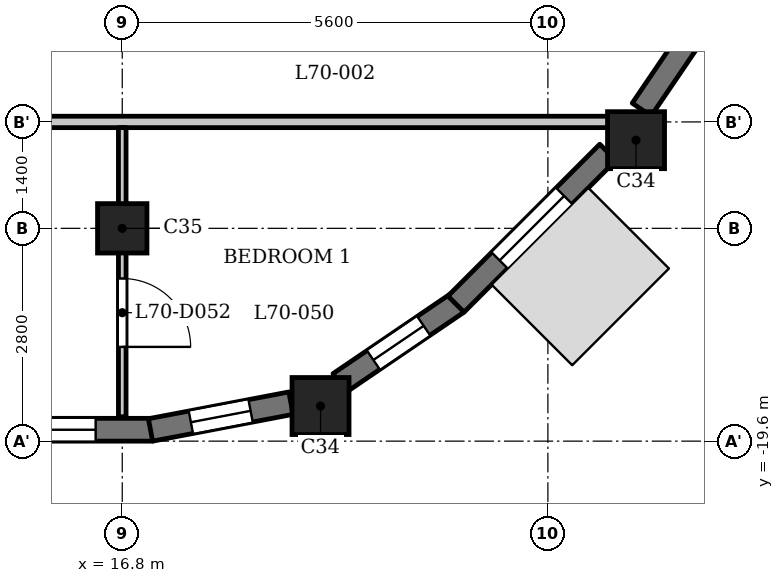
"""IFC4 building model, lengths in metres.
Left out: names, types, materials, properties, quantities, classifications, styles, units other than length and angle.
Written with IfcOpenShell. Run it as: python <this file> out.ifc"""

import sys

from ifc_helpers import new_model, si_unit, direction, frame, frame_2d, origin, origin_2d, place, context, subcontext, project, spatial, rectangle, extrude, element, fill, save


model = new_model("IFC4")
c1 = context("Model", 3, precision=1e-05, world=origin(), true_north=direction((0.0, 1.0)))
c2 = subcontext(c1, "Body", "Model", "MODEL_VIEW")
j1 = project(units=[si_unit("LENGTHUNIT", "METRE"), si_unit("PLANEANGLEUNIT", "RADIAN")], contexts=[c1])
p1 = place(None, origin())
s1 = spatial("IfcSite", under=j1, at=p1, CompositionType="ELEMENT")
p2 = place(p1, origin())
s2 = spatial("IfcBuilding", under=s1, at=p2, CompositionType="ELEMENT")
p3 = place(p2, frame((0.0, 0.0, 269.7)))
s3 = spatial("IfcBuildingStorey", under=s2, at=p3, CompositionType="ELEMENT", Elevation=269.7)
for number, where, z_axis, x_axis in (
    (1, (19.409, -19.138, 0.0), (0.0, 0.0, 1.0), (1.0, 0.0, 0.0)),
    (2, (23.56, -15.64, 0.0), (0.0, 0.0, 1.0), (1.0, 0.0, 0.0)),
):
    element("IfcColumn", number, at=place(p3, frame(where, z_axis=z_axis, x_axis=x_axis)), inside=s3, PredefinedType="COLUMN", context=c2, shape_type="SweptSolid", body=[
        extrude(rectangle(XDim=0.75, YDim=0.75, at=origin_2d()), origin(), (0.0, 0.0, 1.0), 3.5),
    ])
p4 = place(p3, frame((16.8, -16.8, 0.0), z_axis=(0.0, 0.0, 1.0), x_axis=(1.0, 0.0, 0.0)))
e3 = element("IfcColumn", 3, at=p4, inside=s3, PredefinedType="COLUMN", context=c2, shape_type="SweptSolid", body=[
    extrude(rectangle(XDim=0.65, YDim=0.65, at=origin_2d()), origin(), (0.0, 0.0, 1.0), 3.5),
])
p5 = place(p3, frame((14.375, -19.45, 0.0), z_axis=(0.0, 0.0, 1.0), x_axis=(1.0, 0.0, 0.0)))
e4 = element("IfcWall", 4, at=p5, inside=s3, PredefinedType="SOLIDWALL", context=c2, shape_type="SweptSolid", body=[
    extrude(rectangle(XDim=2.825, YDim=0.3, at=frame_2d((1.413, 0.0))), origin(), (0.0, 0.0, 1.0), 2.55),
])
p6 = place(p5, frame((0.275, 0.0, 0.9)))
e5 = element("IfcOpeningElement", 5, at=p6, cuts=e4, PredefinedType="OPENING", context=c2, shape_type="SweptSolid", body=[
    extrude(rectangle(XDim=1.8, YDim=1.25, at=frame_2d((0.9, 0.625))), frame((0.0, 0.16, 0.0), z_axis=(0.0, -1.0, 0.0), x_axis=(1.0, 0.0, 0.0)), (0.0, 0.0, 1.0), 0.32),
])
p7 = place(p3, frame((17.172, -19.453, 0.0), z_axis=(0.0, 0.0, 1.0), x_axis=(0.982284001233, 0.187398348234, 0.0)))
e6 = element("IfcWall", 6, at=p7, inside=s3, PredefinedType="SOLIDWALL", context=c2, shape_type="SweptSolid", body=[
    extrude(rectangle(XDim=1.881, YDim=0.3, at=frame_2d((0.941, 0.0))), origin(), (0.0, 0.0, 1.0), 2.55),
])
p8 = place(p7, frame((0.541, 0.0, 0.6)))
e7 = element("IfcOpeningElement", 7, at=p8, cuts=e6, PredefinedType="OPENING", context=c2, shape_type="SweptSolid", body=[
    extrude(rectangle(XDim=0.8, YDim=1.55, at=frame_2d((0.4, 0.775))), frame((0.0, 0.16, 0.0), z_axis=(0.0, -1.0, 0.0), x_axis=(1.0, 0.0, 0.0)), (0.0, 0.0, 1.0), 0.32),
])
p9 = place(p3, frame((19.657, -18.836, 0.0), z_axis=(0.0, 0.0, 1.0), x_axis=(0.82704477487, 0.562136051469, 0.0)))
e8 = element("IfcWall", 8, at=p9, inside=s3, PredefinedType="SOLIDWALL", context=c2, shape_type="SweptSolid", body=[
    extrude(rectangle(XDim=1.881, YDim=0.3, at=frame_2d((0.94, 0.0))), origin(), (0.0, 0.0, 1.0), 2.55),
])
p10 = place(p9, frame((0.541, 0.0, 0.6)))
e9 = element("IfcOpeningElement", 9, at=p10, cuts=e8, PredefinedType="OPENING", context=c2, shape_type="SweptSolid", body=[
    extrude(rectangle(XDim=0.8, YDim=1.55, at=frame_2d((0.4, 0.775))), frame((0.0, 0.16, 0.0), z_axis=(0.0, -1.0, 0.0), x_axis=(1.0, 0.0, 0.0)), (0.0, 0.0, 1.0), 0.32),
])
p11 = place(p3, frame((21.191, -17.797, 0.0), z_axis=(0.0, 0.0, 1.0), x_axis=(0.707106781187, 0.707106781187, 0.0)))
e10 = element("IfcWall", 10, at=p11, inside=s3, PredefinedType="SOLIDWALL", context=c2, shape_type="SweptSolid", body=[
    extrude(rectangle(XDim=2.825, YDim=0.3, at=frame_2d((1.413, 0.0))), origin(), (0.0, 0.0, 1.0), 2.55),
])
p12 = place(p11, frame((0.812, 0.0, 0.6)))
e11 = element("IfcOpeningElement", 11, at=p12, cuts=e10, PredefinedType="OPENING", context=c2, shape_type="SweptSolid", body=[
    extrude(rectangle(XDim=1.2, YDim=1.55, at=frame_2d((0.6, 0.775))), frame((0.0, 0.16, 0.0), z_axis=(0.0, -1.0, 0.0), x_axis=(1.0, 0.0, 0.0)), (0.0, 0.0, 1.0), 0.32),
])
p13 = place(p3, frame((23.634, -15.237, 0.0), z_axis=(0.0, 0.0, 1.0), x_axis=(0.562099454787, 0.827069648173, 0.0)))
e12 = element("IfcWall", 12, at=p13, inside=s3, PredefinedType="SOLIDWALL", context=c2, shape_type="SweptSolid", body=[
    extrude(rectangle(XDim=1.427, YDim=0.3, at=frame_2d((0.714, 0.0))), origin(), (0.0, 0.0, 1.0), 2.55),
])
p14 = place(p3, frame((-23.322, -15.4, 0.0), z_axis=(0.0, 0.0, 1.0), x_axis=(1.0, 0.0, 0.0)))
e13 = element("IfcWall", 13, at=p14, inside=s3, PredefinedType="PARTITIONING", context=c2, shape_type="SweptSolid", body=[
    extrude(rectangle(XDim=46.872, YDim=0.15, at=frame_2d((23.436, 0.0))), origin(), (0.0, 0.0, 1.0), 3.2),
])
p15 = place(p14, frame((8.172, 0.0, 0.0)))
e14 = element("IfcOpeningElement", 14, at=p15, cuts=e13, PredefinedType="OPENING", context=c2, shape_type="SweptSolid", body=[
    extrude(rectangle(XDim=1.0, YDim=2.1, at=frame_2d((0.5, 1.05))), frame((0.0, 0.085, 0.0), z_axis=(0.0, -1.0, 0.0), x_axis=(1.0, 0.0, 0.0)), (0.0, 0.0, 1.0), 0.17),
])
p16 = place(p14, frame((15.172, 0.0, 0.0)))
e15 = element("IfcOpeningElement", 15, at=p16, cuts=e13, PredefinedType="OPENING", context=c2, shape_type="SweptSolid", body=[
    extrude(rectangle(XDim=1.0, YDim=2.1, at=frame_2d((0.5, 1.05))), frame((0.0, 0.085, 0.0), z_axis=(0.0, -1.0, 0.0), x_axis=(1.0, 0.0, 0.0)), (0.0, 0.0, 1.0), 0.17),
])
p17 = place(p14, frame((31.972, 0.0, 0.0)))
e16 = element("IfcOpeningElement", 16, at=p17, cuts=e13, PredefinedType="OPENING", context=c2, shape_type="SweptSolid", body=[
    extrude(rectangle(XDim=1.0, YDim=2.1, at=frame_2d((0.5, 1.05))), frame((0.0, 0.085, 0.0), z_axis=(0.0, -1.0, 0.0), x_axis=(1.0, 0.0, 0.0)), (0.0, 0.0, 1.0), 0.17),
])
p18 = place(p3, frame((16.8, -19.28, 0.0), z_axis=(0.0, 0.0, 1.0), x_axis=(0.0, 1.0, 0.0)))
e17 = element("IfcWall", 17, at=p18, inside=s3, PredefinedType="PARTITIONING", context=c2, shape_type="SweptSolid", body=[
    extrude(rectangle(XDim=3.805, YDim=0.1, at=frame_2d((1.902, 0.0))), origin(), (0.0, 0.0, 1.0), 3.2),
])
p19 = place(p18, frame((0.92, 0.0, 0.0)))
e18 = element("IfcOpeningElement", 18, at=p19, cuts=e17, PredefinedType="OPENING", context=c2, shape_type="SweptSolid", body=[
    extrude(rectangle(XDim=0.9, YDim=2.1, at=frame_2d((0.45, 1.05))), frame((0.0, 0.06, 0.0), z_axis=(0.0, -1.0, 0.0), x_axis=(1.0, 0.0, 0.0)), (0.0, 0.0, 1.0), 0.12),
])
p20 = place(p19, origin())
e19 = element("IfcDoor", 19, at=p20, inside=s3, OperationType="SINGLE_SWING_LEFT", PredefinedType="DOOR", context=c2, shape_type="SweptSolid", body=[
    extrude(rectangle(XDim=0.9, YDim=2.1, at=frame_2d((0.45, 1.05))), frame((0.0, 0.025, 0.0), z_axis=(0.0, -1.0, 0.0), x_axis=(1.0, 0.0, 0.0)), (0.0, 0.0, 1.0), 0.05),
])
fill(e18, e19)
p21 = place(p6, origin())
e20 = element("IfcWindow", 20, at=p21, inside=s3, PartitioningType="SINGLE_PANEL", PredefinedType="WINDOW", context=c2, shape_type="SweptSolid", body=[
    extrude(rectangle(XDim=1.8, YDim=1.25, at=frame_2d((0.9, 0.625))), frame((0.0, 0.03, 0.0), z_axis=(0.0, -1.0, 0.0), x_axis=(1.0, 0.0, 0.0)), (0.0, 0.0, 1.0), 0.06),
])
fill(e5, e20)
p22 = place(p8, origin())
e21 = element("IfcWindow", 21, at=p22, inside=s3, PartitioningType="SINGLE_PANEL", PredefinedType="WINDOW", context=c2, shape_type="SweptSolid", body=[
    extrude(rectangle(XDim=0.8, YDim=1.55, at=frame_2d((0.4, 0.775))), frame((0.0, 0.03, 0.0), z_axis=(0.0, -1.0, 0.0), x_axis=(1.0, 0.0, 0.0)), (0.0, 0.0, 1.0), 0.06),
])
fill(e7, e21)
p23 = place(p10, origin())
e22 = element("IfcWindow", 22, at=p23, inside=s3, PartitioningType="SINGLE_PANEL", PredefinedType="WINDOW", context=c2, shape_type="SweptSolid", body=[
    extrude(rectangle(XDim=0.8, YDim=1.55, at=frame_2d((0.4, 0.775))), frame((0.0, 0.03, 0.0), z_axis=(0.0, -1.0, 0.0), x_axis=(1.0, 0.0, 0.0)), (0.0, 0.0, 1.0), 0.06),
])
fill(e9, e22)
p24 = place(p12, origin())
e23 = element("IfcWindow", 23, at=p24, inside=s3, PartitioningType="SINGLE_PANEL", PredefinedType="WINDOW", context=c2, shape_type="SweptSolid", body=[
    extrude(rectangle(XDim=1.2, YDim=1.55, at=frame_2d((0.6, 0.775))), frame((0.0, 0.03, 0.0), z_axis=(0.0, -1.0, 0.0), x_axis=(1.0, 0.0, 0.0)), (0.0, 0.0, 1.0), 0.06),
])
fill(e11, e23)
save(model, sys.argv[1])
